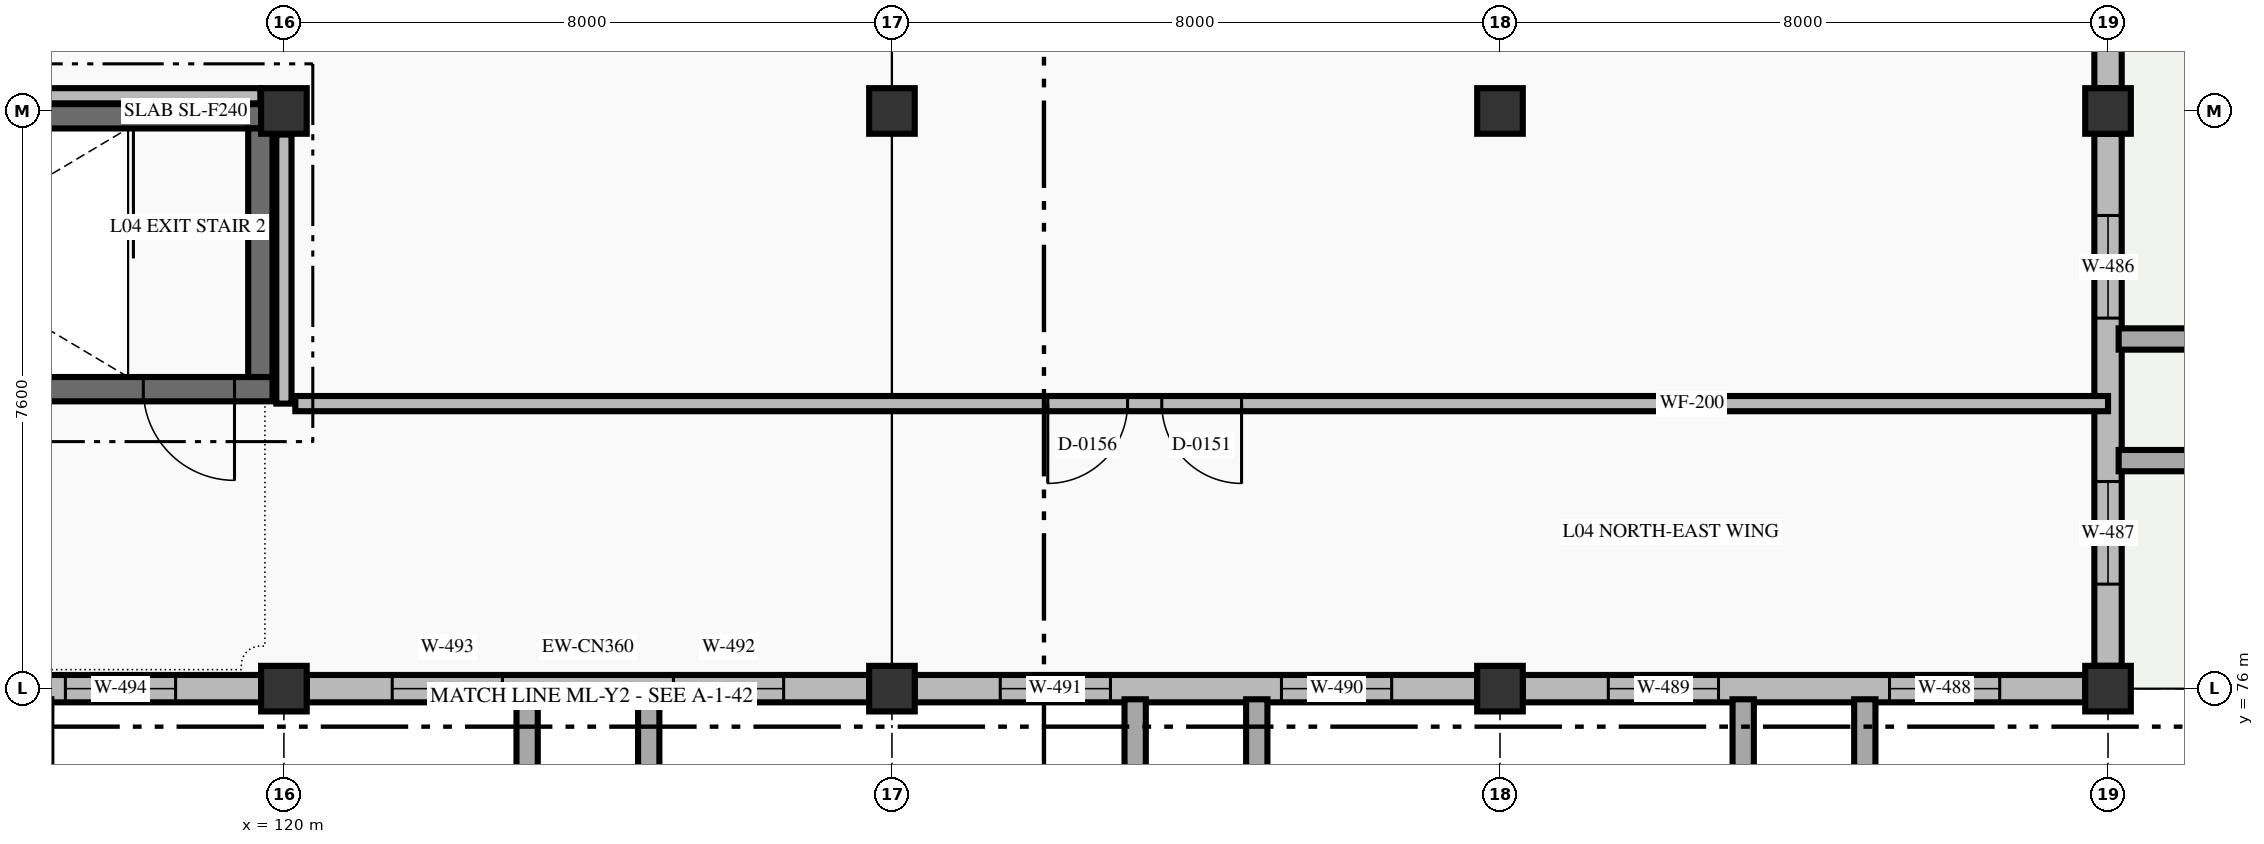
"""IFC4 building model, lengths in metres.
Left out: names, types, materials, properties, quantities, classifications, styles, units other than length and angle.
Written with IfcOpenShell. Run it as: python <this file> out.ifc"""

import sys

from ifc_helpers import new_model, si_unit, direction, frame, frame_2d, origin, origin_2d, place, context, subcontext, project, spatial, rectangle, extrude, element, fill, save


model = new_model("IFC4")
c1 = context("Model", 3, precision=1e-05, world=origin(), true_north=direction((0.0, 1.0)))
c2 = subcontext(c1, "Body", "Model", "MODEL_VIEW")
j1 = project(units=[si_unit("LENGTHUNIT", "METRE"), si_unit("PLANEANGLEUNIT", "RADIAN")], contexts=[c1])
p1 = place(None, origin())
s1 = spatial("IfcSite", under=j1, at=p1, CompositionType="ELEMENT")
p2 = place(p1, origin())
s2 = spatial("IfcBuilding", under=s1, at=p2, CompositionType="ELEMENT")
p3 = place(p2, frame((0.0, 0.0, 14.7)))
s3 = spatial("IfcBuildingStorey", under=s2, at=p3, CompositionType="ELEMENT", Elevation=14.7)
for number, where, z_axis, x_axis in (
    (1, (120.0, 76.0, 0.0), (0.0, 0.0, 1.0), (1.0, 0.0, 0.0)),
    (2, (120.0, 83.6, 0.0), (0.0, 0.0, 1.0), (1.0, 0.0, 0.0)),
    (3, (128.0, 76.0, 0.0), (0.0, 0.0, 1.0), (1.0, 0.0, 0.0)),
    (4, (128.0, 83.6, 0.0), (0.0, 0.0, 1.0), (1.0, 0.0, 0.0)),
    (5, (136.0, 76.0, 0.0), (0.0, 0.0, 1.0), (1.0, 0.0, 0.0)),
    (6, (136.0, 83.6, 0.0), (0.0, 0.0, 1.0), (1.0, 0.0, 0.0)),
    (7, (144.0, 76.0, 0.0), (0.0, 0.0, 1.0), (1.0, 0.0, 0.0)),
    (8, (144.0, 83.6, 0.0), (0.0, 0.0, 1.0), (1.0, 0.0, 0.0)),
):
    element("IfcColumn", number, at=place(p3, frame(where, z_axis=z_axis, x_axis=x_axis)), inside=s3, PredefinedType="COLUMN", context=c2, shape_type="SweptSolid", body=[
        extrude(rectangle(XDim=0.6, YDim=0.6, at=origin_2d()), origin(), (0.0, 0.0, 1.0), 4.2),
    ])
p4 = place(p3, frame((144.0, 90.9, 0.0), z_axis=(0.0, 0.0, 1.0), x_axis=(0.0, -1.0, 0.0)))
e9 = element("IfcWall", 9, at=p4, inside=s3, PredefinedType="STANDARD", context=c2, shape_type="SweptSolid", body=[
    extrude(rectangle(XDim=7.0, YDim=0.36, at=frame_2d((3.5, 0.0))), origin(), (0.0, 0.0, 1.0), 3.37),
])
p5 = place(p4, frame((1.075, 0.0, 0.9)))
e10 = element("IfcOpeningElement", 10, at=p5, cuts=e9, PredefinedType="OPENING", context=c2, shape_type="SweptSolid", body=[
    extrude(rectangle(XDim=1.35, YDim=1.8, at=frame_2d((0.675, 0.9))), frame((0.0, 0.19, 0.0), z_axis=(0.0, -1.0, 0.0), x_axis=(1.0, 0.0, 0.0)), (0.0, 0.0, 1.0), 0.38),
])
p6 = place(p4, frame((4.575, 0.0, 0.9)))
e11 = element("IfcOpeningElement", 11, at=p6, cuts=e9, PredefinedType="OPENING", context=c2, shape_type="SweptSolid", body=[
    extrude(rectangle(XDim=1.35, YDim=1.8, at=frame_2d((0.675, 0.9))), frame((0.0, 0.19, 0.0), z_axis=(0.0, -1.0, 0.0), x_axis=(1.0, 0.0, 0.0)), (0.0, 0.0, 1.0), 0.38),
])
p7 = place(p3, frame((144.0, 83.3, 0.0), z_axis=(0.0, 0.0, 1.0), x_axis=(0.0, -1.0, 0.0)))
e12 = element("IfcWall", 12, at=p7, inside=s3, PredefinedType="STANDARD", context=c2, shape_type="SweptSolid", body=[
    extrude(rectangle(XDim=7.0, YDim=0.36, at=frame_2d((3.5, 0.0))), origin(), (0.0, 0.0, 1.0), 3.37),
])
p8 = place(p7, frame((1.075, 0.0, 0.9)))
e13 = element("IfcOpeningElement", 13, at=p8, cuts=e12, PredefinedType="OPENING", context=c2, shape_type="SweptSolid", body=[
    extrude(rectangle(XDim=1.35, YDim=1.8, at=frame_2d((0.675, 0.9))), frame((0.0, 0.19, 0.0), z_axis=(0.0, -1.0, 0.0), x_axis=(1.0, 0.0, 0.0)), (0.0, 0.0, 1.0), 0.38),
])
p9 = place(p7, frame((4.575, 0.0, 0.9)))
e14 = element("IfcOpeningElement", 14, at=p9, cuts=e12, PredefinedType="OPENING", context=c2, shape_type="SweptSolid", body=[
    extrude(rectangle(XDim=1.35, YDim=1.8, at=frame_2d((0.675, 0.9))), frame((0.0, 0.19, 0.0), z_axis=(0.0, -1.0, 0.0), x_axis=(1.0, 0.0, 0.0)), (0.0, 0.0, 1.0), 0.38),
])
p10 = place(p3, frame((143.7, 76.0, 0.0), z_axis=(0.0, 0.0, 1.0), x_axis=(-1.0, 0.0, 0.0)))
e15 = element("IfcWall", 15, at=p10, inside=s3, PredefinedType="STANDARD", context=c2, shape_type="SweptSolid", body=[
    extrude(rectangle(XDim=7.4, YDim=0.36, at=frame_2d((3.7, 0.0))), origin(), (0.0, 0.0, 1.0), 3.17),
])
p11 = place(p10, frame((1.125, 0.0, 0.9)))
e16 = element("IfcOpeningElement", 16, at=p11, cuts=e15, PredefinedType="OPENING", context=c2, shape_type="SweptSolid", body=[
    extrude(rectangle(XDim=1.45, YDim=1.85, at=frame_2d((0.725, 0.925))), frame((0.0, 0.19, 0.0), z_axis=(0.0, -1.0, 0.0), x_axis=(1.0, 0.0, 0.0)), (0.0, 0.0, 1.0), 0.38),
])
p12 = place(p10, frame((4.825, 0.0, 0.9)))
e17 = element("IfcOpeningElement", 17, at=p12, cuts=e15, PredefinedType="OPENING", context=c2, shape_type="SweptSolid", body=[
    extrude(rectangle(XDim=1.45, YDim=1.85, at=frame_2d((0.725, 0.925))), frame((0.0, 0.19, 0.0), z_axis=(0.0, -1.0, 0.0), x_axis=(1.0, 0.0, 0.0)), (0.0, 0.0, 1.0), 0.38),
])
p13 = place(p3, frame((135.7, 76.0, 0.0), z_axis=(0.0, 0.0, 1.0), x_axis=(-1.0, 0.0, 0.0)))
e18 = element("IfcWall", 18, at=p13, inside=s3, PredefinedType="STANDARD", context=c2, shape_type="SweptSolid", body=[
    extrude(rectangle(XDim=7.4, YDim=0.36, at=frame_2d((3.7, 0.0))), origin(), (0.0, 0.0, 1.0), 3.17),
])
p14 = place(p13, frame((1.125, 0.0, 0.9)))
e19 = element("IfcOpeningElement", 19, at=p14, cuts=e18, PredefinedType="OPENING", context=c2, shape_type="SweptSolid", body=[
    extrude(rectangle(XDim=1.45, YDim=1.85, at=frame_2d((0.725, 0.925))), frame((0.0, 0.19, 0.0), z_axis=(0.0, -1.0, 0.0), x_axis=(1.0, 0.0, 0.0)), (0.0, 0.0, 1.0), 0.38),
])
p15 = place(p13, frame((4.825, 0.0, 0.9)))
e20 = element("IfcOpeningElement", 20, at=p15, cuts=e18, PredefinedType="OPENING", context=c2, shape_type="SweptSolid", body=[
    extrude(rectangle(XDim=1.45, YDim=1.85, at=frame_2d((0.725, 0.925))), frame((0.0, 0.19, 0.0), z_axis=(0.0, -1.0, 0.0), x_axis=(1.0, 0.0, 0.0)), (0.0, 0.0, 1.0), 0.38),
])
p16 = place(p3, frame((127.7, 76.0, 0.0), z_axis=(0.0, 0.0, 1.0), x_axis=(-1.0, 0.0, 0.0)))
e21 = element("IfcWall", 21, at=p16, inside=s3, PredefinedType="STANDARD", context=c2, shape_type="SweptSolid", body=[
    extrude(rectangle(XDim=7.4, YDim=0.36, at=frame_2d((3.7, 0.0))), origin(), (0.0, 0.0, 1.0), 3.17),
])
p17 = place(p16, frame((1.125, 0.0, 0.9)))
e22 = element("IfcOpeningElement", 22, at=p17, cuts=e21, PredefinedType="OPENING", context=c2, shape_type="SweptSolid", body=[
    extrude(rectangle(XDim=1.45, YDim=1.85, at=frame_2d((0.725, 0.925))), frame((0.0, 0.19, 0.0), z_axis=(0.0, -1.0, 0.0), x_axis=(1.0, 0.0, 0.0)), (0.0, 0.0, 1.0), 0.38),
])
p18 = place(p16, frame((4.825, 0.0, 0.9)))
e23 = element("IfcOpeningElement", 23, at=p18, cuts=e21, PredefinedType="OPENING", context=c2, shape_type="SweptSolid", body=[
    extrude(rectangle(XDim=1.45, YDim=1.85, at=frame_2d((0.725, 0.925))), frame((0.0, 0.19, 0.0), z_axis=(0.0, -1.0, 0.0), x_axis=(1.0, 0.0, 0.0)), (0.0, 0.0, 1.0), 0.38),
])
p19 = place(p3, frame((119.7, 76.0, 0.0), z_axis=(0.0, 0.0, 1.0), x_axis=(-1.0, 0.0, 0.0)))
e24 = element("IfcWall", 24, at=p19, inside=s3, PredefinedType="STANDARD", context=c2, shape_type="SweptSolid", body=[
    extrude(rectangle(XDim=7.4, YDim=0.36, at=frame_2d((3.7, 0.0))), origin(), (0.0, 0.0, 1.0), 3.17),
])
p20 = place(p19, frame((1.125, 0.0, 0.9)))
e25 = element("IfcOpeningElement", 25, at=p20, cuts=e24, PredefinedType="OPENING", context=c2, shape_type="SweptSolid", body=[
    extrude(rectangle(XDim=1.45, YDim=1.85, at=frame_2d((0.725, 0.925))), frame((0.0, 0.19, 0.0), z_axis=(0.0, -1.0, 0.0), x_axis=(1.0, 0.0, 0.0)), (0.0, 0.0, 1.0), 0.38),
])
p21 = place(p19, frame((4.825, 0.0, 0.9)))
e26 = element("IfcOpeningElement", 26, at=p21, cuts=e24, PredefinedType="OPENING", context=c2, shape_type="SweptSolid", body=[
    extrude(rectangle(XDim=1.45, YDim=1.85, at=frame_2d((0.725, 0.925))), frame((0.0, 0.19, 0.0), z_axis=(0.0, -1.0, 0.0), x_axis=(1.0, 0.0, 0.0)), (0.0, 0.0, 1.0), 0.38),
])
p22 = place(p3, frame((119.85, 79.94, 0.0), z_axis=(0.0, 0.0, 1.0), x_axis=(-1.0, 0.0, 0.0)))
e27 = element("IfcWall", 27, at=p22, inside=s3, PredefinedType="SHEAR", context=c2, shape_type="SweptSolid", body=[
    extrude(rectangle(XDim=7.7, YDim=0.32, at=frame_2d((3.85, 0.0))), origin(), (0.0, 0.0, 1.0), 3.93),
])
p23 = place(p22, frame((0.5, 0.0, 0.0)))
e28 = element("IfcOpeningElement", 28, at=p23, cuts=e27, PredefinedType="OPENING", context=c2, shape_type="SweptSolid", body=[
    extrude(rectangle(XDim=1.2, YDim=2.2, at=frame_2d((0.6, 1.1))), frame((0.0, 0.17, 0.0), z_axis=(0.0, -1.0, 0.0), x_axis=(1.0, 0.0, 0.0)), (0.0, 0.0, 1.0), 0.34),
])
p24 = place(p3, frame((112.15, 83.53, 0.0), z_axis=(0.0, 0.0, 1.0), x_axis=(1.0, 0.0, 0.0)))
e29 = element("IfcWall", 29, at=p24, inside=s3, PredefinedType="SHEAR", context=c2, shape_type="SweptSolid", body=[
    extrude(rectangle(XDim=7.7, YDim=0.32, at=frame_2d((3.85, 0.0))), origin(), (0.0, 0.0, 1.0), 3.93),
])
p25 = place(p3, frame((119.69, 83.37, 0.0), z_axis=(0.0, 0.0, 1.0), x_axis=(0.0, -1.0, 0.0)))
e30 = element("IfcWall", 30, at=p25, inside=s3, PredefinedType="SHEAR", context=c2, shape_type="SweptSolid", body=[
    extrude(rectangle(XDim=3.27, YDim=0.32, at=frame_2d((1.635, 0.0))), origin(), (0.0, 0.0, 1.0), 3.93),
])
p26 = place(p3, frame((112.31, 83.8, 0.0), z_axis=(0.0, 0.0, 1.0), x_axis=(1.0, 0.0, 0.0)))
e31 = element("IfcWall", 31, at=p26, inside=s3, PredefinedType="STANDARD", context=c2, shape_type="SweptSolid", body=[
    extrude(rectangle(XDim=7.38, YDim=0.2, at=frame_2d((3.69, 0.0))), origin(), (0.0, 0.0, 1.0), 3.17),
])
p27 = place(p3, frame((120.0, 83.29, 0.0), z_axis=(0.0, 0.0, 1.0), x_axis=(0.0, -1.0, 0.0)))
e32 = element("IfcWall", 32, at=p27, inside=s3, PredefinedType="STANDARD", context=c2, shape_type="SweptSolid", body=[
    extrude(rectangle(XDim=3.54, YDim=0.2, at=frame_2d((1.77, 0.0))), origin(), (0.0, 0.0, 1.0), 3.37),
])
p28 = place(p3, frame((144.0, 79.75, 0.0), z_axis=(0.0, 0.0, 1.0), x_axis=(-1.0, 0.0, 0.0)))
e33 = element("IfcWall", 33, at=p28, inside=s3, PredefinedType="STANDARD", context=c2, shape_type="SweptSolid", body=[
    extrude(rectangle(XDim=23.85, YDim=0.2, at=frame_2d((11.925, 0.0))), origin(), (0.0, 0.0, 1.0), 3.93),
])
p29 = place(p28, frame((11.4, 0.0, 0.0)))
e34 = element("IfcOpeningElement", 34, at=p29, cuts=e33, PredefinedType="OPENING", context=c2, shape_type="SweptSolid", body=[
    extrude(rectangle(XDim=1.05, YDim=2.15, at=frame_2d((0.525, 1.075))), frame((0.0, 0.11, 0.0), z_axis=(0.0, -1.0, 0.0), x_axis=(1.0, 0.0, 0.0)), (0.0, 0.0, 1.0), 0.22),
])
p30 = place(p28, frame((12.9, 0.0, 0.0)))
e35 = element("IfcOpeningElement", 35, at=p30, cuts=e33, PredefinedType="OPENING", context=c2, shape_type="SweptSolid", body=[
    extrude(rectangle(XDim=1.05, YDim=2.15, at=frame_2d((0.525, 1.075))), frame((0.0, 0.11, 0.0), z_axis=(0.0, -1.0, 0.0), x_axis=(1.0, 0.0, 0.0)), (0.0, 0.0, 1.0), 0.22),
])
p31 = place(p8, origin())
e36 = element("IfcWindow", 36, at=p31, inside=s3, PartitioningType="DOUBLE_PANEL_HORIZONTAL", PredefinedType="WINDOW", context=c2, shape_type="SweptSolid", body=[
    extrude(rectangle(XDim=1.35, YDim=1.8, at=frame_2d((0.675, 0.9))), frame((0.0, 0.03, 0.0), z_axis=(0.0, -1.0, 0.0), x_axis=(1.0, 0.0, 0.0)), (0.0, 0.0, 1.0), 0.06),
])
fill(e13, e36)
p32 = place(p9, origin())
e37 = element("IfcWindow", 37, at=p32, inside=s3, PartitioningType="DOUBLE_PANEL_HORIZONTAL", PredefinedType="WINDOW", context=c2, shape_type="SweptSolid", body=[
    extrude(rectangle(XDim=1.35, YDim=1.8, at=frame_2d((0.675, 0.9))), frame((0.0, 0.03, 0.0), z_axis=(0.0, -1.0, 0.0), x_axis=(1.0, 0.0, 0.0)), (0.0, 0.0, 1.0), 0.06),
])
fill(e14, e37)
p33 = place(p11, origin())
e38 = element("IfcWindow", 38, at=p33, inside=s3, PartitioningType="DOUBLE_PANEL_VERTICAL", PredefinedType="WINDOW", context=c2, shape_type="SweptSolid", body=[
    extrude(rectangle(XDim=1.45, YDim=1.85, at=frame_2d((0.725, 0.925))), frame((0.0, 0.03, 0.0), z_axis=(0.0, -1.0, 0.0), x_axis=(1.0, 0.0, 0.0)), (0.0, 0.0, 1.0), 0.06),
])
fill(e16, e38)
p34 = place(p12, origin())
e39 = element("IfcWindow", 39, at=p34, inside=s3, PartitioningType="DOUBLE_PANEL_VERTICAL", PredefinedType="WINDOW", context=c2, shape_type="SweptSolid", body=[
    extrude(rectangle(XDim=1.45, YDim=1.85, at=frame_2d((0.725, 0.925))), frame((0.0, 0.03, 0.0), z_axis=(0.0, -1.0, 0.0), x_axis=(1.0, 0.0, 0.0)), (0.0, 0.0, 1.0), 0.06),
])
fill(e17, e39)
p35 = place(p14, origin())
e40 = element("IfcWindow", 40, at=p35, inside=s3, PartitioningType="DOUBLE_PANEL_VERTICAL", PredefinedType="WINDOW", context=c2, shape_type="SweptSolid", body=[
    extrude(rectangle(XDim=1.45, YDim=1.85, at=frame_2d((0.725, 0.925))), frame((0.0, 0.03, 0.0), z_axis=(0.0, -1.0, 0.0), x_axis=(1.0, 0.0, 0.0)), (0.0, 0.0, 1.0), 0.06),
])
fill(e19, e40)
p36 = place(p15, origin())
e41 = element("IfcWindow", 41, at=p36, inside=s3, PartitioningType="DOUBLE_PANEL_VERTICAL", PredefinedType="WINDOW", context=c2, shape_type="SweptSolid", body=[
    extrude(rectangle(XDim=1.45, YDim=1.85, at=frame_2d((0.725, 0.925))), frame((0.0, 0.03, 0.0), z_axis=(0.0, -1.0, 0.0), x_axis=(1.0, 0.0, 0.0)), (0.0, 0.0, 1.0), 0.06),
])
fill(e20, e41)
p37 = place(p17, origin())
e42 = element("IfcWindow", 42, at=p37, inside=s3, PartitioningType="DOUBLE_PANEL_VERTICAL", PredefinedType="WINDOW", context=c2, shape_type="SweptSolid", body=[
    extrude(rectangle(XDim=1.45, YDim=1.85, at=frame_2d((0.725, 0.925))), frame((0.0, 0.03, 0.0), z_axis=(0.0, -1.0, 0.0), x_axis=(1.0, 0.0, 0.0)), (0.0, 0.0, 1.0), 0.06),
])
fill(e22, e42)
p38 = place(p18, origin())
e43 = element("IfcWindow", 43, at=p38, inside=s3, PartitioningType="DOUBLE_PANEL_VERTICAL", PredefinedType="WINDOW", context=c2, shape_type="SweptSolid", body=[
    extrude(rectangle(XDim=1.45, YDim=1.85, at=frame_2d((0.725, 0.925))), frame((0.0, 0.03, 0.0), z_axis=(0.0, -1.0, 0.0), x_axis=(1.0, 0.0, 0.0)), (0.0, 0.0, 1.0), 0.06),
])
fill(e23, e43)
p39 = place(p20, origin())
e44 = element("IfcWindow", 44, at=p39, inside=s3, PartitioningType="DOUBLE_PANEL_VERTICAL", PredefinedType="WINDOW", context=c2, shape_type="SweptSolid", body=[
    extrude(rectangle(XDim=1.45, YDim=1.85, at=frame_2d((0.725, 0.925))), frame((0.0, 0.03, 0.0), z_axis=(0.0, -1.0, 0.0), x_axis=(1.0, 0.0, 0.0)), (0.0, 0.0, 1.0), 0.06),
])
fill(e25, e44)
p40 = place(p23, origin())
e45 = element("IfcDoor", 45, at=p40, inside=s3, OperationType="SINGLE_SWING_LEFT", PredefinedType="DOOR", context=c2, shape_type="SweptSolid", body=[
    extrude(rectangle(XDim=1.2, YDim=2.2, at=frame_2d((0.6, 1.1))), frame((0.0, 0.025, 0.0), z_axis=(0.0, -1.0, 0.0), x_axis=(1.0, 0.0, 0.0)), (0.0, 0.0, 1.0), 0.05),
])
fill(e28, e45)
p41 = place(p29, origin())
e46 = element("IfcDoor", 46, at=p41, inside=s3, OperationType="SINGLE_SWING_LEFT", PredefinedType="DOOR", context=c2, shape_type="SweptSolid", body=[
    extrude(rectangle(XDim=1.05, YDim=2.15, at=frame_2d((0.525, 1.075))), frame((0.0, 0.025, 0.0), z_axis=(0.0, -1.0, 0.0), x_axis=(1.0, 0.0, 0.0)), (0.0, 0.0, 1.0), 0.05),
])
fill(e34, e46)
p42 = place(p30, origin())
e47 = element("IfcDoor", 47, at=p42, inside=s3, OperationType="SINGLE_SWING_RIGHT", PredefinedType="DOOR", context=c2, shape_type="SweptSolid", body=[
    extrude(rectangle(XDim=1.05, YDim=2.15, at=frame_2d((0.525, 1.075))), frame((0.0, 0.025, 0.0), z_axis=(0.0, -1.0, 0.0), x_axis=(1.0, 0.0, 0.0)), (0.0, 0.0, 1.0), 0.05),
])
fill(e35, e47)
save(model, sys.argv[1])
